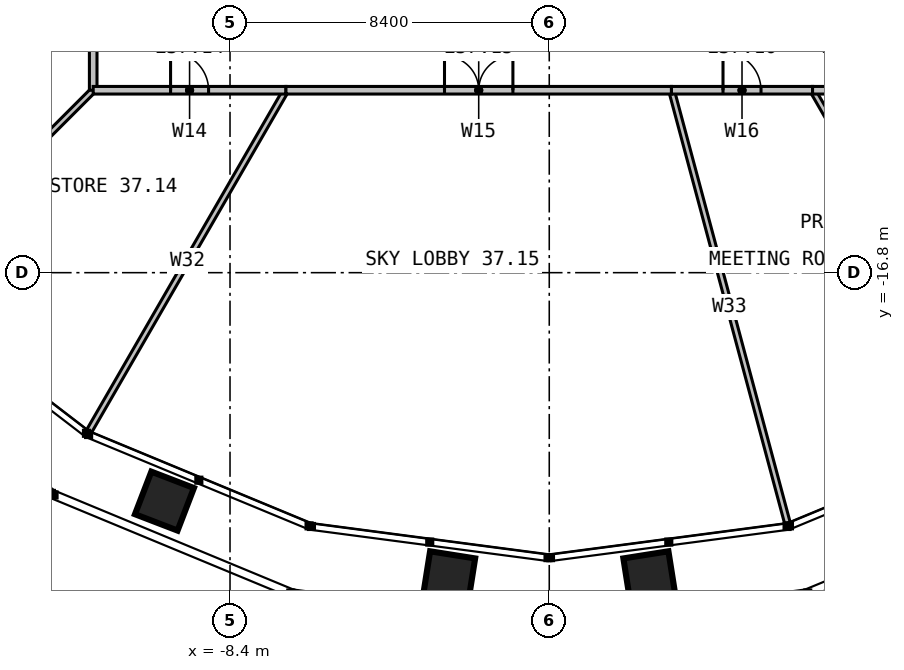
"""IFC4 building model, lengths in metres.
Left out: names, types, materials, properties, quantities, classifications, styles, units other than length and angle.
Written with IfcOpenShell. Run it as: python <this file> out.ifc"""

import sys

from ifc_helpers import new_model, si_unit, direction, frame, frame_2d, origin, place, context, subcontext, project, spatial, rectangle, extrude, element, fill, save


model = new_model("IFC4")
c1 = context("Model", 3, precision=1e-05, world=origin(), true_north=direction((0.0, 1.0)))
c2 = subcontext(c1, "Body", "Model", "MODEL_VIEW")
j1 = project(units=[si_unit("LENGTHUNIT", "METRE"), si_unit("PLANEANGLEUNIT", "RADIAN")], contexts=[c1])
p1 = place(None, origin())
s1 = spatial("IfcSite", under=j1, at=p1, CompositionType="ELEMENT")
p2 = place(p1, origin())
s2 = spatial("IfcBuilding", under=s1, at=p2, CompositionType="ELEMENT")
p3 = place(p2, frame((0.0, 0.0, 155.0)))
s3 = spatial("IfcBuildingStorey", under=s2, at=p3, CompositionType="ELEMENT", Elevation=155.0)
p4 = place(p3, frame((-12.0, -6.928, 0.0), z_axis=(0.0, 0.0, 1.0), x_axis=(-0.86602185845, -0.500006140648, 0.0)))
e1 = element("IfcWall", 1, at=p4, inside=s3, PredefinedType="PARTITIONING", context=c2, shape_type="SweptSolid", body=[
    extrude(rectangle(XDim=10.355, YDim=0.15, at=frame_2d((5.177, 0.0))), origin(), (0.0, 0.0, 1.0), 2.89),
])
p5 = place(p3, frame((-12.0, -12.0, 0.0), z_axis=(0.0, 0.0, 1.0), x_axis=(-0.707106781187, -0.707106781187, 0.0)))
e2 = element("IfcWall", 2, at=p5, inside=s3, PredefinedType="PARTITIONING", context=c2, shape_type="SweptSolid", body=[
    extrude(rectangle(XDim=7.24, YDim=0.15, at=frame_2d((3.62, 0.0))), origin(), (0.0, 0.0, 1.0), 2.89),
])
p6 = place(p3, frame((-6.928, -12.0, 0.0), z_axis=(0.0, 0.0, 1.0), x_axis=(-0.500006140648, -0.86602185845, 0.0)))
e3 = element("IfcWall", 3, at=p6, inside=s3, PredefinedType="PARTITIONING", context=c2, shape_type="SweptSolid", body=[
    extrude(rectangle(XDim=10.355, YDim=0.15, at=frame_2d((5.177, 0.0))), origin(), (0.0, 0.0, 1.0), 2.89),
])
p7 = place(p3, frame((3.215, -12.0, 0.0), z_axis=(0.0, 0.0, 1.0), x_axis=(0.25882649561, -0.965923829901, 0.0)))
e4 = element("IfcWall", 4, at=p7, inside=s3, PredefinedType="PARTITIONING", context=c2, shape_type="SweptSolid", body=[
    extrude(rectangle(XDim=11.788, YDim=0.15, at=frame_2d((5.894, 0.0))), origin(), (0.0, 0.0, 1.0), 2.89),
])
p8 = place(p3, frame((6.928, -12.0, 0.0), z_axis=(0.0, 0.0, 1.0), x_axis=(0.500006140648, -0.86602185845, 0.0)))
e5 = element("IfcWall", 5, at=p8, inside=s3, PredefinedType="PARTITIONING", context=c2, shape_type="SweptSolid", body=[
    extrude(rectangle(XDim=10.355, YDim=0.15, at=frame_2d((5.177, 0.0))), origin(), (0.0, 0.0, 1.0), 2.89),
])
p9 = place(p3, frame((-12.0, -6.928, 0.0), z_axis=(0.0, 0.0, 1.0), x_axis=(0.0, -1.0, 0.0)))
e6 = element("IfcWall", 6, at=p9, inside=s3, PredefinedType="PARTITIONING", context=c2, shape_type="SweptSolid", body=[
    extrude(rectangle(XDim=5.072, YDim=0.2, at=frame_2d((2.536, 0.0))), origin(), (0.0, 0.0, 1.0), 3.8),
])
p10 = place(p9, frame((2.036, 0.0, 0.0)))
e7 = element("IfcOpeningElement", 7, at=p10, cuts=e6, PredefinedType="OPENING", context=c2, shape_type="SweptSolid", body=[
    extrude(rectangle(XDim=1.0, YDim=2.2, at=frame_2d((0.5, 1.1))), frame((0.0, 0.11, 0.0), z_axis=(0.0, -1.0, 0.0), x_axis=(1.0, 0.0, 0.0)), (0.0, 0.0, 1.0), 0.22),
])
p11 = place(p3, frame((-12.0, -12.0, 0.0), z_axis=(0.0, 0.0, 1.0), x_axis=(1.0, 0.0, 0.0)))
e8 = element("IfcWall", 8, at=p11, inside=s3, PredefinedType="PARTITIONING", context=c2, shape_type="SweptSolid", body=[
    extrude(rectangle(XDim=5.072, YDim=0.2, at=frame_2d((2.536, 0.0))), origin(), (0.0, 0.0, 1.0), 3.8),
])
p12 = place(p11, frame((2.036, 0.0, 0.0)))
e9 = element("IfcOpeningElement", 9, at=p12, cuts=e8, PredefinedType="OPENING", context=c2, shape_type="SweptSolid", body=[
    extrude(rectangle(XDim=1.0, YDim=2.2, at=frame_2d((0.5, 1.1))), frame((0.0, 0.11, 0.0), z_axis=(0.0, -1.0, 0.0), x_axis=(1.0, 0.0, 0.0)), (0.0, 0.0, 1.0), 0.22),
])
p13 = place(p3, frame((-6.928, -12.0, 0.0), z_axis=(0.0, 0.0, 1.0), x_axis=(1.0, 0.0, 0.0)))
e10 = element("IfcWall", 10, at=p13, inside=s3, PredefinedType="PARTITIONING", context=c2, shape_type="SweptSolid", body=[
    extrude(rectangle(XDim=10.144, YDim=0.2, at=frame_2d((5.072, 0.0))), origin(), (0.0, 0.0, 1.0), 3.8),
])
p14 = place(p13, frame((4.172, 0.0, 0.0)))
e11 = element("IfcOpeningElement", 11, at=p14, cuts=e10, PredefinedType="OPENING", context=c2, shape_type="SweptSolid", body=[
    extrude(rectangle(XDim=1.8, YDim=2.2, at=frame_2d((0.9, 1.1))), frame((0.0, 0.11, 0.0), z_axis=(0.0, -1.0, 0.0), x_axis=(1.0, 0.0, 0.0)), (0.0, 0.0, 1.0), 0.22),
])
p15 = place(p3, frame((3.215, -12.0, 0.0), z_axis=(0.0, 0.0, 1.0), x_axis=(1.0, 0.0, 0.0)))
e12 = element("IfcWall", 12, at=p15, inside=s3, PredefinedType="PARTITIONING", context=c2, shape_type="SweptSolid", body=[
    extrude(rectangle(XDim=3.713, YDim=0.2, at=frame_2d((1.856, 0.0))), origin(), (0.0, 0.0, 1.0), 3.8),
])
p16 = place(p15, frame((1.356, 0.0, 0.0)))
e13 = element("IfcOpeningElement", 13, at=p16, cuts=e12, PredefinedType="OPENING", context=c2, shape_type="SweptSolid", body=[
    extrude(rectangle(XDim=1.0, YDim=2.2, at=frame_2d((0.5, 1.1))), frame((0.0, 0.11, 0.0), z_axis=(0.0, -1.0, 0.0), x_axis=(1.0, 0.0, 0.0)), (0.0, 0.0, 1.0), 0.22),
])
p17 = place(p3, frame((6.928, -12.0, 0.0), z_axis=(0.0, 0.0, 1.0), x_axis=(1.0, 0.0, 0.0)))
e14 = element("IfcWall", 14, at=p17, inside=s3, PredefinedType="PARTITIONING", context=c2, shape_type="SweptSolid", body=[
    extrude(rectangle(XDim=2.28, YDim=0.2, at=frame_2d((1.14, 0.0))), origin(), (0.0, 0.0, 1.0), 3.8),
])
p18 = place(p17, frame((0.64, 0.0, 0.0)))
e15 = element("IfcOpeningElement", 15, at=p18, cuts=e14, PredefinedType="OPENING", context=c2, shape_type="SweptSolid", body=[
    extrude(rectangle(XDim=1.0, YDim=2.2, at=frame_2d((0.5, 1.1))), frame((0.0, 0.11, 0.0), z_axis=(0.0, -1.0, 0.0), x_axis=(1.0, 0.0, 0.0)), (0.0, 0.0, 1.0), 0.22),
])
p19 = place(p12, origin())
e16 = element("IfcDoor", 16, at=p19, inside=s3, OperationType="SINGLE_SWING_LEFT", PredefinedType="DOOR", context=c2, shape_type="SweptSolid", body=[
    extrude(rectangle(XDim=1.0, YDim=2.2, at=frame_2d((0.5, 1.1))), frame((0.0, 0.025, 0.0), z_axis=(0.0, -1.0, 0.0), x_axis=(1.0, 0.0, 0.0)), (0.0, 0.0, 1.0), 0.05),
])
fill(e9, e16)
p20 = place(p14, origin())
e17 = element("IfcDoor", 17, at=p20, inside=s3, OperationType="DOUBLE_DOOR_SINGLE_SWING", PredefinedType="DOOR", context=c2, shape_type="SweptSolid", body=[
    extrude(rectangle(XDim=1.8, YDim=2.2, at=frame_2d((0.9, 1.1))), frame((0.0, 0.025, 0.0), z_axis=(0.0, -1.0, 0.0), x_axis=(1.0, 0.0, 0.0)), (0.0, 0.0, 1.0), 0.05),
])
fill(e11, e17)
p21 = place(p16, origin())
e18 = element("IfcDoor", 18, at=p21, inside=s3, OperationType="SINGLE_SWING_LEFT", PredefinedType="DOOR", context=c2, shape_type="SweptSolid", body=[
    extrude(rectangle(XDim=1.0, YDim=2.2, at=frame_2d((0.5, 1.1))), frame((0.0, 0.025, 0.0), z_axis=(0.0, -1.0, 0.0), x_axis=(1.0, 0.0, 0.0)), (0.0, 0.0, 1.0), 0.05),
])
fill(e13, e18)
save(model, sys.argv[1])
